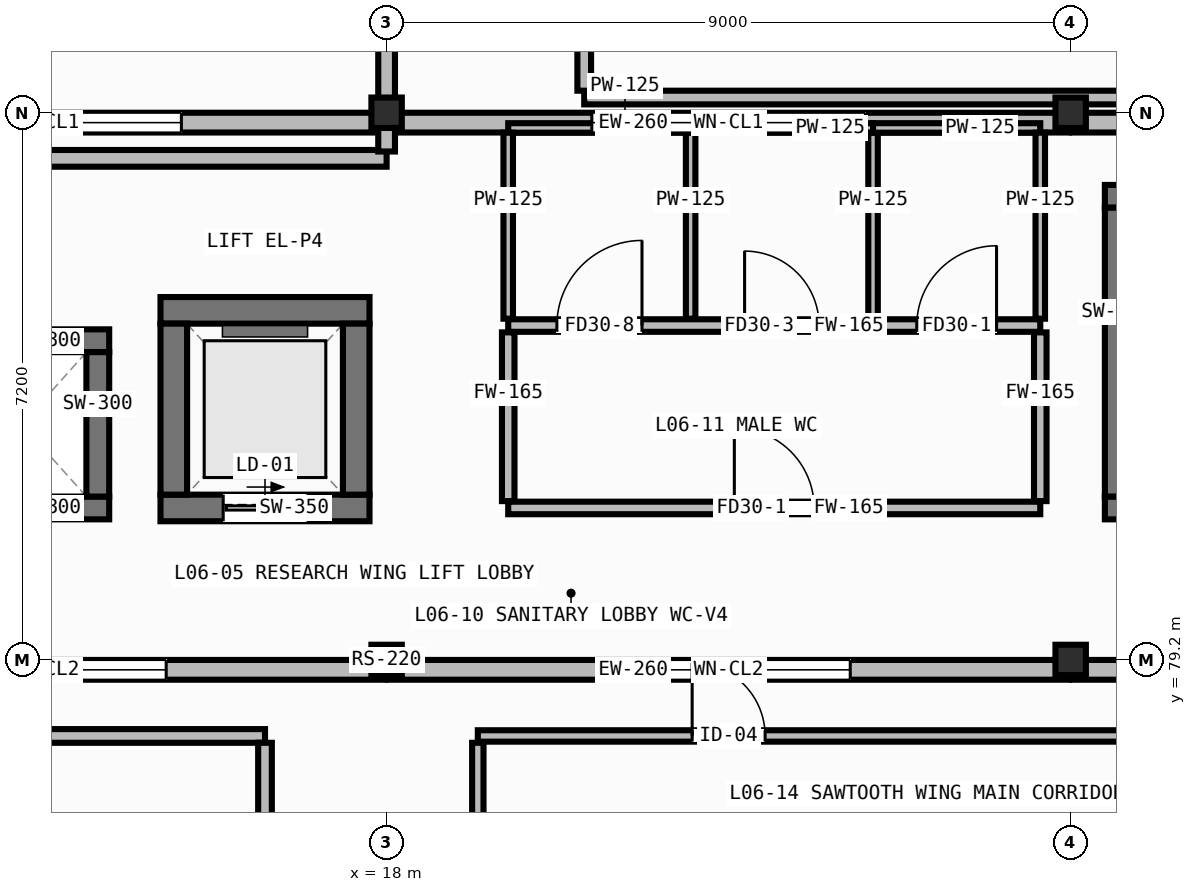
"""IFC4 building model, lengths in metres.
Left out: names, types, materials, properties, quantities, classifications, styles, units other than length and angle.
Written with IfcOpenShell. Run it as: python <this file> out.ifc"""

import sys

from ifc_helpers import new_model, si_unit, direction, frame, frame_2d, origin, origin_2d, place, context, subcontext, project, spatial, rectangle, hollow_rectangle, extrude, element, fill, save


model = new_model("IFC4")
c1 = context("Model", 3, precision=1e-05, world=origin(), true_north=direction((0.0, 1.0)))
c2 = subcontext(c1, "Body", "Model", "MODEL_VIEW")
j1 = project(units=[si_unit("LENGTHUNIT", "METRE"), si_unit("PLANEANGLEUNIT", "RADIAN")], contexts=[c1])
p1 = place(None, origin())
s1 = spatial("IfcSite", under=j1, at=p1, CompositionType="ELEMENT")
p2 = place(p1, origin())
s2 = spatial("IfcBuilding", under=s1, at=p2, CompositionType="ELEMENT")
p3 = place(p2, frame((0.0, 0.0, 20.6)))
s3 = spatial("IfcBuildingStorey", under=s2, at=p3, CompositionType="ELEMENT", Elevation=20.6)
for number, where, z_axis, x_axis in (
    (1, (18.0, 79.2, 0.0), (0.0, 0.0, 1.0), (1.0, 0.0, 0.0)),
    (2, (18.0, 86.4, 0.0), (0.0, 0.0, 1.0), (1.0, 0.0, 0.0)),
    (3, (27.0, 79.2, 0.0), (0.0, 0.0, 1.0), (1.0, 0.0, 0.0)),
    (4, (27.0, 86.4, 0.0), (0.0, 0.0, 1.0), (1.0, 0.0, 0.0)),
):
    element("IfcColumn", number, at=place(p3, frame(where, z_axis=z_axis, x_axis=x_axis)), inside=s3, PredefinedType="COLUMN", context=c2, shape_type="SweptSolid", body=[
        extrude(hollow_rectangle(XDim=0.4, YDim=0.4, WallThickness=0.016, at=origin_2d()), origin(), (0.0, 0.0, 1.0), 3.18),
    ])
p4 = place(p3, frame((17.98, 79.07, 3.4), z_axis=(0.0, 0.0, 1.0), x_axis=(-1.0, 0.0, 0.0)))
e5 = element("IfcWall", 5, at=p4, inside=s3, PredefinedType="STANDARD", context=c2, shape_type="SweptSolid", body=[
    extrude(rectangle(XDim=8.96, YDim=0.26, at=frame_2d((4.48, 0.0))), origin(), (0.0, 0.0, 1.0), 2.05),
])
p5 = place(p4, frame((2.88, 0.0, 0.38)))
e6 = element("IfcOpeningElement", 6, at=p5, cuts=e5, PredefinedType="OPENING", context=c2, shape_type="SweptSolid", body=[
    extrude(rectangle(XDim=3.2, YDim=1.1, at=frame_2d((1.6, 0.55))), frame((0.0, 0.142, 0.0), z_axis=(0.0, -1.0, 0.0), x_axis=(1.0, 0.0, 0.0)), (0.0, 0.0, 1.0), 0.284),
])
p6 = place(p3, frame((26.98, 79.07, 3.4), z_axis=(0.0, 0.0, 1.0), x_axis=(-1.0, 0.0, 0.0)))
e7 = element("IfcWall", 7, at=p6, inside=s3, PredefinedType="STANDARD", context=c2, shape_type="SweptSolid", body=[
    extrude(rectangle(XDim=8.96, YDim=0.26, at=frame_2d((4.48, 0.0))), origin(), (0.0, 0.0, 1.0), 2.05),
])
p7 = place(p6, frame((2.88, 0.0, 0.38)))
e8 = element("IfcOpeningElement", 8, at=p7, cuts=e7, PredefinedType="OPENING", context=c2, shape_type="SweptSolid", body=[
    extrude(rectangle(XDim=3.2, YDim=1.1, at=frame_2d((1.6, 0.55))), frame((0.0, 0.142, 0.0), z_axis=(0.0, -1.0, 0.0), x_axis=(1.0, 0.0, 0.0)), (0.0, 0.0, 1.0), 0.284),
])
p8 = place(p3, frame((35.8, 79.07, 3.4), z_axis=(0.0, 0.0, 1.0), x_axis=(-1.0, 0.0, 0.0)))
e9 = element("IfcWall", 9, at=p8, inside=s3, PredefinedType="STANDARD", context=c2, shape_type="SweptSolid", body=[
    extrude(rectangle(XDim=8.78, YDim=0.26, at=frame_2d((4.39, 0.0))), origin(), (0.0, 0.0, 1.0), 2.05),
])
p9 = place(p8, frame((2.79, 0.0, 0.38)))
e10 = element("IfcOpeningElement", 10, at=p9, cuts=e9, PredefinedType="OPENING", context=c2, shape_type="SweptSolid", body=[
    extrude(rectangle(XDim=3.2, YDim=1.1, at=frame_2d((1.6, 0.55))), frame((0.0, 0.142, 0.0), z_axis=(0.0, -1.0, 0.0), x_axis=(1.0, 0.0, 0.0)), (0.0, 0.0, 1.0), 0.284),
])
p10 = place(p3, frame((17.98, 86.27, 3.4), z_axis=(0.0, 0.0, 1.0), x_axis=(-1.0, 0.0, 0.0)))
e11 = element("IfcWall", 11, at=p10, inside=s3, PredefinedType="STANDARD", context=c2, shape_type="SweptSolid", body=[
    extrude(rectangle(XDim=8.96, YDim=0.26, at=frame_2d((4.48, 0.0))), origin(), (0.0, 0.0, 1.0), 2.05),
])
p11 = place(p10, frame((2.68, 0.0, 0.38)))
e12 = element("IfcOpeningElement", 12, at=p11, cuts=e11, PredefinedType="OPENING", context=c2, shape_type="SweptSolid", body=[
    extrude(rectangle(XDim=3.6, YDim=1.2, at=frame_2d((1.8, 0.6))), frame((0.0, 0.142, 0.0), z_axis=(0.0, -1.0, 0.0), x_axis=(1.0, 0.0, 0.0)), (0.0, 0.0, 1.0), 0.284),
])
p12 = place(p3, frame((26.98, 86.27, 3.4), z_axis=(0.0, 0.0, 1.0), x_axis=(-1.0, 0.0, 0.0)))
e13 = element("IfcWall", 13, at=p12, inside=s3, PredefinedType="STANDARD", context=c2, shape_type="SweptSolid", body=[
    extrude(rectangle(XDim=8.96, YDim=0.26, at=frame_2d((4.48, 0.0))), origin(), (0.0, 0.0, 1.0), 2.05),
])
p13 = place(p12, frame((2.68, 0.0, 0.38)))
e14 = element("IfcOpeningElement", 14, at=p13, cuts=e13, PredefinedType="OPENING", context=c2, shape_type="SweptSolid", body=[
    extrude(rectangle(XDim=3.6, YDim=1.2, at=frame_2d((1.8, 0.6))), frame((0.0, 0.142, 0.0), z_axis=(0.0, -1.0, 0.0), x_axis=(1.0, 0.0, 0.0)), (0.0, 0.0, 1.0), 0.284),
])
p14 = place(p3, frame((35.8, 86.27, 3.4), z_axis=(0.0, 0.0, 1.0), x_axis=(-1.0, 0.0, 0.0)))
e15 = element("IfcWall", 15, at=p14, inside=s3, PredefinedType="STANDARD", context=c2, shape_type="SweptSolid", body=[
    extrude(rectangle(XDim=8.78, YDim=0.26, at=frame_2d((4.39, 0.0))), origin(), (0.0, 0.0, 1.0), 2.05),
])
p15 = place(p14, frame((2.59, 0.0, 0.38)))
e16 = element("IfcOpeningElement", 16, at=p15, cuts=e15, PredefinedType="OPENING", context=c2, shape_type="SweptSolid", body=[
    extrude(rectangle(XDim=3.6, YDim=1.2, at=frame_2d((1.8, 0.6))), frame((0.0, 0.142, 0.0), z_axis=(0.0, -1.0, 0.0), x_axis=(1.0, 0.0, 0.0)), (0.0, 0.0, 1.0), 0.284),
])
p16 = place(p3, frame((27.45, 81.2, 0.0), z_axis=(0.0, 0.0, 1.0), x_axis=(1.0, 0.0, 0.0)))
e17 = element("IfcWall", 17, at=p16, inside=s3, PredefinedType="SHEAR", context=c2, shape_type="SweptSolid", body=[
    extrude(rectangle(XDim=8.1, YDim=0.3, at=frame_2d((4.05, 0.0))), origin(), (0.0, 0.0, 1.0), 3.18),
])
p17 = place(p16, frame((0.5, 0.0, 0.0)))
e18 = element("IfcOpeningElement", 18, at=p17, cuts=e17, PredefinedType="OPENING", context=c2, shape_type="SweptSolid", body=[
    extrude(rectangle(XDim=1.2, YDim=2.1, at=frame_2d((0.6, 1.05))), frame((0.0, 0.162, 0.0), z_axis=(0.0, -1.0, 0.0), x_axis=(1.0, 0.0, 0.0)), (0.0, 0.0, 1.0), 0.324),
])
p18 = place(p3, frame((27.45, 85.3, 0.0), z_axis=(0.0, 0.0, 1.0), x_axis=(1.0, 0.0, 0.0)))
e19 = element("IfcWall", 19, at=p18, inside=s3, PredefinedType="SHEAR", context=c2, shape_type="SweptSolid", body=[
    extrude(rectangle(XDim=8.1, YDim=0.3, at=frame_2d((4.05, 0.0))), origin(), (0.0, 0.0, 1.0), 3.18),
])
p19 = place(p3, frame((27.6, 81.35, 0.0), z_axis=(0.0, 0.0, 1.0), x_axis=(0.0, 1.0, 0.0)))
e20 = element("IfcWall", 20, at=p19, inside=s3, PredefinedType="SHEAR", context=c2, shape_type="SweptSolid", body=[
    extrude(rectangle(XDim=3.8, YDim=0.3, at=frame_2d((1.9, 0.0))), origin(), (0.0, 0.0, 1.0), 3.18),
])
p20 = place(p3, frame((15.025, 81.2, 0.0), z_axis=(0.0, 0.0, 1.0), x_axis=(1.0, 0.0, 0.0)))
e21 = element("IfcWall", 21, at=p20, inside=s3, PredefinedType="SHEAR", context=c2, shape_type="SweptSolid", body=[
    extrude(rectangle(XDim=2.75, YDim=0.35, at=frame_2d((1.375, 0.0))), origin(), (0.0, 0.0, 1.0), 3.18),
])
p21 = place(p20, frame((0.825, 0.0, 0.0)))
e22 = element("IfcOpeningElement", 22, at=p21, cuts=e21, PredefinedType="OPENING", context=c2, shape_type="SweptSolid", body=[
    extrude(rectangle(XDim=1.1, YDim=2.1, at=frame_2d((0.55, 1.05))), frame((0.0, 0.187, 0.0), z_axis=(0.0, -1.0, 0.0), x_axis=(1.0, 0.0, 0.0)), (0.0, 0.0, 1.0), 0.374),
])
p22 = place(p3, frame((15.025, 83.8, 0.0), z_axis=(0.0, 0.0, 1.0), x_axis=(1.0, 0.0, 0.0)))
e23 = element("IfcWall", 23, at=p22, inside=s3, PredefinedType="SHEAR", context=c2, shape_type="SweptSolid", body=[
    extrude(rectangle(XDim=2.75, YDim=0.35, at=frame_2d((1.375, 0.0))), origin(), (0.0, 0.0, 1.0), 3.18),
])
for number, where, z_axis, x_axis in (
    (24, (15.2, 81.375, 0.0), (0.0, 0.0, 1.0), (0.0, 1.0, 0.0)),
    (25, (17.6, 81.375, 0.0), (0.0, 0.0, 1.0), (0.0, 1.0, 0.0)),
):
    element("IfcWall", number, at=place(p3, frame(where, z_axis=z_axis, x_axis=x_axis)), inside=s3, PredefinedType="SHEAR", context=c2, shape_type="SweptSolid", body=[
        extrude(rectangle(XDim=2.25, YDim=0.35, at=frame_2d((1.125, 0.0))), origin(), (0.0, 0.0, 1.0), 3.18),
    ])
for number, where, z_axis, x_axis in (
    (26, (12.05, 81.2, 0.0), (0.0, 0.0, 1.0), (1.0, 0.0, 0.0)),
    (27, (12.05, 83.4, 0.0), (0.0, 0.0, 1.0), (1.0, 0.0, 0.0)),
):
    element("IfcWall", number, at=place(p3, frame(where, z_axis=z_axis, x_axis=x_axis)), inside=s3, PredefinedType="SHEAR", context=c2, shape_type="SweptSolid", body=[
        extrude(rectangle(XDim=2.3, YDim=0.3, at=frame_2d((1.15, 0.0))), origin(), (0.0, 0.0, 1.0), 3.18),
    ])
p23 = place(p3, frame((14.2, 81.35, 0.0), z_axis=(0.0, 0.0, 1.0), x_axis=(0.0, 1.0, 0.0)))
e28 = element("IfcWall", 28, at=p23, inside=s3, PredefinedType="SHEAR", context=c2, shape_type="SweptSolid", body=[
    extrude(rectangle(XDim=1.9, YDim=0.3, at=frame_2d((0.95, 0.0))), origin(), (0.0, 0.0, 1.0), 3.18),
])
p24 = place(p3, frame((19.6, 81.2, 0.0), z_axis=(0.0, 0.0, 1.0), x_axis=(1.0, 0.0, 0.0)))
e29 = element("IfcWall", 29, at=p24, inside=s3, PredefinedType="PARTITIONING", context=c2, shape_type="SweptSolid", body=[
    extrude(rectangle(XDim=7.0, YDim=0.165, at=frame_2d((3.5, 0.0))), origin(), (0.0, 0.0, 1.0), 3.18),
])
p25 = place(p24, frame((2.975, 0.0, 0.0)))
e30 = element("IfcOpeningElement", 30, at=p25, cuts=e29, PredefinedType="OPENING", context=c2, shape_type="SweptSolid", body=[
    extrude(rectangle(XDim=1.05, YDim=2.1, at=frame_2d((0.525, 1.05))), frame((0.0, 0.094, 0.0), z_axis=(0.0, -1.0, 0.0), x_axis=(1.0, 0.0, 0.0)), (0.0, 0.0, 1.0), 0.189),
])
p26 = place(p3, frame((19.6, 83.6, 0.0), z_axis=(0.0, 0.0, 1.0), x_axis=(1.0, 0.0, 0.0)))
e31 = element("IfcWall", 31, at=p26, inside=s3, PredefinedType="PARTITIONING", context=c2, shape_type="SweptSolid", body=[
    extrude(rectangle(XDim=7.0, YDim=0.165, at=frame_2d((3.5, 0.0))), origin(), (0.0, 0.0, 1.0), 3.18),
])
p27 = place(p26, frame((0.64, 0.0, 0.0)))
e32 = element("IfcOpeningElement", 32, at=p27, cuts=e31, PredefinedType="OPENING", context=c2, shape_type="SweptSolid", body=[
    extrude(rectangle(XDim=1.12, YDim=2.08, at=frame_2d((0.56, 1.04))), frame((0.0, 0.094, 0.0), z_axis=(0.0, -1.0, 0.0), x_axis=(1.0, 0.0, 0.0)), (0.0, 0.0, 1.0), 0.189),
])
p28 = place(p26, frame((3.11, 0.0, 0.0)))
e33 = element("IfcOpeningElement", 33, at=p28, cuts=e31, PredefinedType="OPENING", context=c2, shape_type="SweptSolid", body=[
    extrude(rectangle(XDim=0.98, YDim=2.02, at=frame_2d((0.49, 1.01))), frame((0.0, 0.094, 0.0), z_axis=(0.0, -1.0, 0.0), x_axis=(1.0, 0.0, 0.0)), (0.0, 0.0, 1.0), 0.189),
])
p29 = place(p26, frame((5.375, 0.0, 0.0)))
e34 = element("IfcOpeningElement", 34, at=p29, cuts=e31, PredefinedType="OPENING", context=c2, shape_type="SweptSolid", body=[
    extrude(rectangle(XDim=1.05, YDim=2.1, at=frame_2d((0.525, 1.05))), frame((0.0, 0.094, 0.0), z_axis=(0.0, -1.0, 0.0), x_axis=(1.0, 0.0, 0.0)), (0.0, 0.0, 1.0), 0.189),
])
for number, where, z_axis, x_axis in (
    (35, (19.6, 81.29, 0.0), (0.0, 0.0, 1.0), (0.0, 1.0, 0.0)),
    (36, (26.6, 81.29, 0.0), (0.0, 0.0, 1.0), (0.0, 1.0, 0.0)),
):
    element("IfcWall", number, at=place(p3, frame(where, z_axis=z_axis, x_axis=x_axis)), inside=s3, PredefinedType="PARTITIONING", context=c2, shape_type="SweptSolid", body=[
        extrude(rectangle(XDim=2.22, YDim=0.165, at=frame_2d((1.11, 0.0))), origin(), (0.0, 0.0, 1.0), 3.18),
    ])
p30 = place(p3, frame((19.6, 86.2, 0.0), z_axis=(0.0, 0.0, 1.0), x_axis=(1.0, 0.0, 0.0)))
e37 = element("IfcWall", 37, at=p30, inside=s3, PredefinedType="PARTITIONING", context=c2, shape_type="SweptSolid", body=[
    extrude(rectangle(XDim=2.4, YDim=0.125, at=frame_2d((1.2, 0.0))), origin(), (0.0, 0.0, 1.0), 2.46),
])
for number, where, z_axis, x_axis in (
    (38, (19.6, 83.69, 0.0), (0.0, 0.0, 1.0), (0.0, 1.0, 0.0)),
    (39, (22.0, 83.69, 0.0), (0.0, 0.0, 1.0), (0.0, 1.0, 0.0)),
):
    element("IfcWall", number, at=place(p3, frame(where, z_axis=z_axis, x_axis=x_axis)), inside=s3, PredefinedType="PARTITIONING", context=c2, shape_type="SweptSolid", body=[
        extrude(rectangle(XDim=2.448, YDim=0.125, at=frame_2d((1.224, 0.0))), origin(), (0.0, 0.0, 1.0), 3.18),
    ])
p31 = place(p3, frame((22.0, 86.2, 0.0), z_axis=(0.0, 0.0, 1.0), x_axis=(1.0, 0.0, 0.0)))
e40 = element("IfcWall", 40, at=p31, inside=s3, PredefinedType="PARTITIONING", context=c2, shape_type="SweptSolid", body=[
    extrude(rectangle(XDim=2.4, YDim=0.125, at=frame_2d((1.2, 0.0))), origin(), (0.0, 0.0, 1.0), 2.46),
])
p32 = place(p3, frame((24.4, 83.69, 0.0), z_axis=(0.0, 0.0, 1.0), x_axis=(0.0, 1.0, 0.0)))
e41 = element("IfcWall", 41, at=p32, inside=s3, PredefinedType="PARTITIONING", context=c2, shape_type="SweptSolid", body=[
    extrude(rectangle(XDim=2.448, YDim=0.125, at=frame_2d((1.224, 0.0))), origin(), (0.0, 0.0, 1.0), 3.18),
])
p33 = place(p3, frame((24.4, 86.2, 0.0), z_axis=(0.0, 0.0, 1.0), x_axis=(1.0, 0.0, 0.0)))
e42 = element("IfcWall", 42, at=p33, inside=s3, PredefinedType="PARTITIONING", context=c2, shape_type="SweptSolid", body=[
    extrude(rectangle(XDim=2.2, YDim=0.125, at=frame_2d((1.1, 0.0))), origin(), (0.0, 0.0, 1.0), 2.46),
])
p34 = place(p3, frame((26.6, 83.69, 0.0), z_axis=(0.0, 0.0, 1.0), x_axis=(0.0, 1.0, 0.0)))
e43 = element("IfcWall", 43, at=p34, inside=s3, PredefinedType="PARTITIONING", context=c2, shape_type="SweptSolid", body=[
    extrude(rectangle(XDim=2.448, YDim=0.125, at=frame_2d((1.224, 0.0))), origin(), (0.0, 0.0, 1.0), 3.18),
])
p35 = place(p3, frame((0.035, 78.2, 0.0), z_axis=(0.0, 0.0, 1.0), x_axis=(1.0, 0.0, 0.0)))
e44 = element("IfcWall", 44, at=p35, inside=s3, PredefinedType="PARTITIONING", context=c2, shape_type="SweptSolid", body=[
    extrude(rectangle(XDim=16.365, YDim=0.18, at=frame_2d((8.183, 0.0))), origin(), (0.0, 0.0, 1.0), 3.18),
])
p36 = place(p35, frame((3.815, 0.0, 0.0)))
e45 = element("IfcOpeningElement", 45, at=p36, cuts=e44, PredefinedType="OPENING", context=c2, shape_type="SweptSolid", body=[
    extrude(rectangle(XDim=1.3, YDim=2.08, at=frame_2d((0.65, 1.04))), frame((0.0, 0.102, 0.0), z_axis=(0.0, -1.0, 0.0), x_axis=(1.0, 0.0, 0.0)), (0.0, 0.0, 1.0), 0.204),
])
p37 = place(p3, frame((16.4, 64.945, 0.0), z_axis=(0.0, 0.0, 1.0), x_axis=(0.0, 1.0, 0.0)))
e46 = element("IfcWall", 46, at=p37, inside=s3, PredefinedType="PARTITIONING", context=c2, shape_type="SweptSolid", body=[
    extrude(rectangle(XDim=13.165, YDim=0.18, at=frame_2d((6.583, 0.0))), origin(), (0.0, 0.0, 1.0), 3.18),
])
p38 = place(p3, frame((19.2, 78.2, 0.0), z_axis=(0.0, 0.0, 1.0), x_axis=(1.0, 0.0, 0.0)))
e47 = element("IfcWall", 47, at=p38, inside=s3, PredefinedType="PARTITIONING", context=c2, shape_type="SweptSolid", body=[
    extrude(rectangle(XDim=16.765, YDim=0.15, at=frame_2d((8.383, 0.0))), origin(), (0.0, 0.0, 1.0), 3.18),
])
p39 = place(p38, frame((2.82, 0.0, 0.0)))
e48 = element("IfcOpeningElement", 48, at=p39, cuts=e47, PredefinedType="OPENING", context=c2, shape_type="SweptSolid", body=[
    extrude(rectangle(XDim=0.96, YDim=2.1, at=frame_2d((0.48, 1.05))), frame((0.0, 0.087, 0.0), z_axis=(0.0, -1.0, 0.0), x_axis=(1.0, 0.0, 0.0)), (0.0, 0.0, 1.0), 0.174),
])
p40 = place(p3, frame((19.2, 71.49, 0.0), z_axis=(0.0, 0.0, 1.0), x_axis=(0.0, 1.0, 0.0)))
e49 = element("IfcWall", 49, at=p40, inside=s3, PredefinedType="PARTITIONING", context=c2, shape_type="SweptSolid", body=[
    extrude(rectangle(XDim=6.62, YDim=0.15, at=frame_2d((3.31, 0.0))), origin(), (0.0, 0.0, 1.0), 3.18),
])
p41 = place(p3, frame((0.145, 85.8, 0.0), z_axis=(0.0, 0.0, 1.0), x_axis=(1.0, 0.0, 0.0)))
e50 = element("IfcWall", 50, at=p41, inside=s3, PredefinedType="PARTITIONING", context=c2, shape_type="SweptSolid", body=[
    extrude(rectangle(XDim=17.855, YDim=0.22, at=frame_2d((8.927, 0.0))), origin(), (0.0, 0.0, 1.0), 3.18),
])
p42 = place(p3, frame((18.0, 85.89, 0.0), z_axis=(0.0, 0.0, 1.0), x_axis=(0.0, 1.0, 0.0)))
e51 = element("IfcWall", 51, at=p42, inside=s3, PredefinedType="PARTITIONING", context=c2, shape_type="SweptSolid", body=[
    extrude(rectangle(XDim=7.145, YDim=0.22, at=frame_2d((3.573, 0.0))), origin(), (0.0, 0.0, 1.0), 2.46),
])
p43 = place(p42, frame((3.36, 0.0, 0.0)))
e52 = element("IfcOpeningElement", 52, at=p43, cuts=e51, PredefinedType="OPENING", context=c2, shape_type="SweptSolid", body=[
    extrude(rectangle(XDim=1.1, YDim=2.08, at=frame_2d((0.55, 1.04))), frame((0.0, 0.122, 0.0), z_axis=(0.0, -1.0, 0.0), x_axis=(1.0, 0.0, 0.0)), (0.0, 0.0, 1.0), 0.244),
])
p44 = place(p3, frame((20.6, 86.6, 0.0), z_axis=(0.0, 0.0, 1.0), x_axis=(1.0, 0.0, 0.0)))
e53 = element("IfcWall", 53, at=p44, inside=s3, PredefinedType="PARTITIONING", context=c2, shape_type="SweptSolid", body=[
    extrude(rectangle(XDim=14.945, YDim=0.18, at=frame_2d((7.472, 0.0))), origin(), (0.0, 0.0, 1.0), 2.46),
])
p45 = place(p3, frame((20.6, 86.69, 0.0), z_axis=(0.0, 0.0, 1.0), x_axis=(0.0, 1.0, 0.0)))
e54 = element("IfcWall", 54, at=p45, inside=s3, PredefinedType="PARTITIONING", context=c2, shape_type="SweptSolid", body=[
    extrude(rectangle(XDim=6.765, YDim=0.18, at=frame_2d((3.383, 0.0))), origin(), (0.0, 0.0, 1.0), 3.18),
])
p46 = place(p45, frame((2.785, 0.0, 0.0)))
e55 = element("IfcOpeningElement", 55, at=p46, cuts=e54, PredefinedType="OPENING", context=c2, shape_type="SweptSolid", body=[
    extrude(rectangle(XDim=1.05, YDim=2.1, at=frame_2d((0.525, 1.05))), frame((0.0, 0.102, 0.0), z_axis=(0.0, -1.0, 0.0), x_axis=(1.0, 0.0, 0.0)), (0.0, 0.0, 1.0), 0.204),
])
p47 = place(p5, origin())
e56 = element("IfcWindow", 56, at=p47, inside=s3, PartitioningType="DOUBLE_PANEL_VERTICAL", PredefinedType="WINDOW", context=c2, shape_type="SweptSolid", body=[
    extrude(rectangle(XDim=3.2, YDim=1.1, at=frame_2d((1.6, 0.55))), frame((0.0, 0.03, 0.0), z_axis=(0.0, -1.0, 0.0), x_axis=(1.0, 0.0, 0.0)), (0.0, 0.0, 1.0), 0.06),
])
fill(e6, e56)
p48 = place(p7, origin())
e57 = element("IfcWindow", 57, at=p48, inside=s3, PartitioningType="DOUBLE_PANEL_VERTICAL", PredefinedType="WINDOW", context=c2, shape_type="SweptSolid", body=[
    extrude(rectangle(XDim=3.2, YDim=1.1, at=frame_2d((1.6, 0.55))), frame((0.0, 0.03, 0.0), z_axis=(0.0, -1.0, 0.0), x_axis=(1.0, 0.0, 0.0)), (0.0, 0.0, 1.0), 0.06),
])
fill(e8, e57)
p49 = place(p11, origin())
e58 = element("IfcWindow", 58, at=p49, inside=s3, PartitioningType="DOUBLE_PANEL_VERTICAL", PredefinedType="WINDOW", context=c2, shape_type="SweptSolid", body=[
    extrude(rectangle(XDim=3.6, YDim=1.2, at=frame_2d((1.8, 0.6))), frame((0.0, 0.03, 0.0), z_axis=(0.0, -1.0, 0.0), x_axis=(1.0, 0.0, 0.0)), (0.0, 0.0, 1.0), 0.06),
])
fill(e12, e58)
p50 = place(p13, origin())
e59 = element("IfcWindow", 59, at=p50, inside=s3, PartitioningType="DOUBLE_PANEL_VERTICAL", PredefinedType="WINDOW", context=c2, shape_type="SweptSolid", body=[
    extrude(rectangle(XDim=3.6, YDim=1.2, at=frame_2d((1.8, 0.6))), frame((0.0, 0.03, 0.0), z_axis=(0.0, -1.0, 0.0), x_axis=(1.0, 0.0, 0.0)), (0.0, 0.0, 1.0), 0.06),
])
fill(e14, e59)
p51 = place(p21, origin())
e60 = element("IfcDoor", 60, at=p51, inside=s3, OperationType="SLIDING_TO_LEFT", PredefinedType="DOOR", context=c2, shape_type="SweptSolid", body=[
    extrude(rectangle(XDim=1.1, YDim=2.1, at=frame_2d((0.55, 1.05))), frame((0.0, 0.025, 0.0), z_axis=(0.0, -1.0, 0.0), x_axis=(1.0, 0.0, 0.0)), (0.0, 0.0, 1.0), 0.05),
])
fill(e22, e60)
p52 = place(p25, origin())
e61 = element("IfcDoor", 61, at=p52, inside=s3, OperationType="SINGLE_SWING_LEFT", PredefinedType="DOOR", context=c2, shape_type="SweptSolid", body=[
    extrude(rectangle(XDim=1.05, YDim=2.1, at=frame_2d((0.525, 1.05))), frame((0.0, 0.025, 0.0), z_axis=(0.0, -1.0, 0.0), x_axis=(1.0, 0.0, 0.0)), (0.0, 0.0, 1.0), 0.05),
])
fill(e30, e61)
p53 = place(p27, origin())
e62 = element("IfcDoor", 62, at=p53, inside=s3, OperationType="SINGLE_SWING_RIGHT", PredefinedType="DOOR", context=c2, shape_type="SweptSolid", body=[
    extrude(rectangle(XDim=1.12, YDim=2.08, at=frame_2d((0.56, 1.04))), frame((0.0, 0.025, 0.0), z_axis=(0.0, -1.0, 0.0), x_axis=(1.0, 0.0, 0.0)), (0.0, 0.0, 1.0), 0.05),
])
fill(e32, e62)
p54 = place(p28, origin())
e63 = element("IfcDoor", 63, at=p54, inside=s3, OperationType="SINGLE_SWING_LEFT", PredefinedType="DOOR", context=c2, shape_type="SweptSolid", body=[
    extrude(rectangle(XDim=0.98, YDim=2.02, at=frame_2d((0.49, 1.01))), frame((0.0, 0.025, 0.0), z_axis=(0.0, -1.0, 0.0), x_axis=(1.0, 0.0, 0.0)), (0.0, 0.0, 1.0), 0.05),
])
fill(e33, e63)
p55 = place(p29, origin())
e64 = element("IfcDoor", 64, at=p55, inside=s3, OperationType="SINGLE_SWING_RIGHT", PredefinedType="DOOR", context=c2, shape_type="SweptSolid", body=[
    extrude(rectangle(XDim=1.05, YDim=2.1, at=frame_2d((0.525, 1.05))), frame((0.0, 0.025, 0.0), z_axis=(0.0, -1.0, 0.0), x_axis=(1.0, 0.0, 0.0)), (0.0, 0.0, 1.0), 0.05),
])
fill(e34, e64)
p56 = place(p39, origin())
e65 = element("IfcDoor", 65, at=p56, inside=s3, OperationType="SINGLE_SWING_LEFT", PredefinedType="DOOR", context=c2, shape_type="SweptSolid", body=[
    extrude(rectangle(XDim=0.96, YDim=2.1, at=frame_2d((0.48, 1.05))), frame((0.0, 0.025, 0.0), z_axis=(0.0, -1.0, 0.0), x_axis=(1.0, 0.0, 0.0)), (0.0, 0.0, 1.0), 0.05),
])
fill(e48, e65)
save(model, sys.argv[1])
